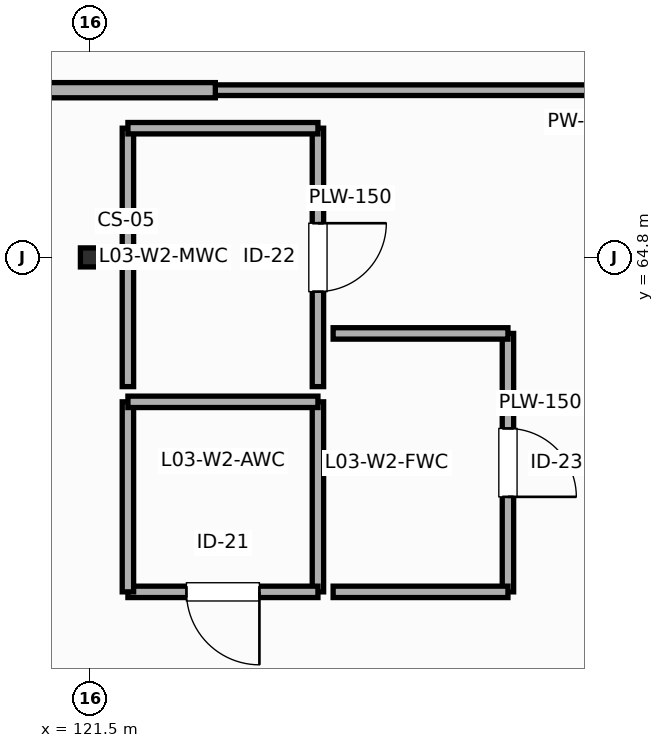
"""IFC4 building model, lengths in metres.
Left out: names, types, materials, properties, quantities, classifications, styles, units other than length and angle.
Written with IfcOpenShell. Run it as: python <this file> out.ifc"""

import sys

from ifc_helpers import new_model, si_unit, direction, frame, frame_2d, origin, origin_2d, place, context, subcontext, project, spatial, rectangle, hollow_rectangle, extrude, element, fill, save


model = new_model("IFC4")
c1 = context("Model", 3, precision=1e-05, world=origin(), true_north=direction((0.0, 1.0)))
c2 = subcontext(c1, "Body", "Model", "MODEL_VIEW")
j1 = project(units=[si_unit("LENGTHUNIT", "METRE"), si_unit("PLANEANGLEUNIT", "RADIAN")], contexts=[c1])
p1 = place(None, origin())
s1 = spatial("IfcSite", under=j1, at=p1, CompositionType="ELEMENT")
p2 = place(p1, origin())
s2 = spatial("IfcBuilding", under=s1, at=p2, CompositionType="ELEMENT")
p3 = place(p2, frame((0.0, 0.0, 15.0)))
s3 = spatial("IfcBuildingStorey", under=s2, at=p3, CompositionType="ELEMENT", Elevation=15.0)
p4 = place(p3, frame((121.5, 64.8, 0.0), z_axis=(0.0, 0.0, 1.0), x_axis=(1.0, 0.0, 0.0)))
e1 = element("IfcColumn", 1, at=p4, inside=s3, PredefinedType="COLUMN", context=c2, shape_type="SweptSolid", body=[
    extrude(hollow_rectangle(XDim=0.25, YDim=0.25, WallThickness=0.012, InnerFilletRadius=0.012, OuterFilletRadius=0.025, at=origin_2d()), origin(), (0.0, 0.0, 1.0), 4.2),
])
p5 = place(p3, frame((124.5, 62.9, 0.0), z_axis=(0.0, 0.0, 1.0), x_axis=(0.0, -1.0, 0.0)))
e2 = element("IfcWall", 2, at=p5, inside=s3, PredefinedType="PLUMBINGWALL", context=c2, shape_type="SweptSolid", body=[
    extrude(rectangle(XDim=2.5, YDim=0.15, at=frame_2d((1.25, 0.0))), origin(), (0.0, 0.0, 1.0), 3.92),
])
p6 = place(p3, frame((124.5, 60.4, 0.0), z_axis=(0.0, 0.0, 1.0), x_axis=(-1.0, 0.0, 0.0)))
e3 = element("IfcWall", 3, at=p6, inside=s3, PredefinedType="PLUMBINGWALL", context=c2, shape_type="SweptSolid", body=[
    extrude(rectangle(XDim=2.5, YDim=0.15, at=frame_2d((1.25, 0.0))), origin(), (0.0, 0.0, 1.0), 3.92),
])
p7 = place(p6, frame((0.77, 0.0, 0.0)))
e4 = element("IfcOpeningElement", 4, at=p7, cuts=e3, PredefinedType="OPENING", context=c2, shape_type="SweptSolid", body=[
    extrude(rectangle(XDim=0.96, YDim=2.16, at=frame_2d((0.48, 1.08))), frame((0.0, 0.085, 0.0), z_axis=(0.0, -1.0, 0.0), x_axis=(1.0, 0.0, 0.0)), (0.0, 0.0, 1.0), 0.17),
])
for number, where, z_axis, x_axis in (
    (5, (122.0, 60.4, 0.0), (0.0, 0.0, 1.0), (0.0, 1.0, 0.0)),
    (6, (122.0, 62.9, 0.0), (0.0, 0.0, 1.0), (1.0, 0.0, 0.0)),
):
    element("IfcWall", number, at=place(p3, frame(where, z_axis=z_axis, x_axis=x_axis)), inside=s3, PredefinedType="PLUMBINGWALL", context=c2, shape_type="SweptSolid", body=[
        extrude(rectangle(XDim=2.5, YDim=0.15, at=frame_2d((1.25, 0.0))), origin(), (0.0, 0.0, 1.0), 3.92),
    ])
p8 = place(p3, frame((127.0, 63.8, 0.0), z_axis=(0.0, 0.0, 1.0), x_axis=(0.0, -1.0, 0.0)))
e7 = element("IfcWall", 7, at=p8, inside=s3, PredefinedType="PLUMBINGWALL", context=c2, shape_type="SweptSolid", body=[
    extrude(rectangle(XDim=3.4, YDim=0.15, at=frame_2d((1.7, 0.0))), origin(), (0.0, 0.0, 1.0), 3.92),
])
p9 = place(p8, frame((1.25, 0.0, 0.0)))
e8 = element("IfcOpeningElement", 8, at=p9, cuts=e7, PredefinedType="OPENING", context=c2, shape_type="SweptSolid", body=[
    extrude(rectangle(XDim=0.9, YDim=2.2, at=frame_2d((0.45, 1.1))), frame((0.0, 0.085, 0.0), z_axis=(0.0, -1.0, 0.0), x_axis=(1.0, 0.0, 0.0)), (0.0, 0.0, 1.0), 0.17),
])
for number, where, z_axis, x_axis in (
    (9, (127.0, 60.4, 0.0), (0.0, 0.0, 1.0), (-1.0, 0.0, 0.0)),
    (10, (124.7, 63.8, 0.0), (0.0, 0.0, 1.0), (1.0, 0.0, 0.0)),
):
    element("IfcWall", number, at=place(p3, frame(where, z_axis=z_axis, x_axis=x_axis)), inside=s3, PredefinedType="PLUMBINGWALL", context=c2, shape_type="SweptSolid", body=[
        extrude(rectangle(XDim=2.3, YDim=0.15, at=frame_2d((1.15, 0.0))), origin(), (0.0, 0.0, 1.0), 3.92),
    ])
p10 = place(p3, frame((124.5, 66.5, 0.0), z_axis=(0.0, 0.0, 1.0), x_axis=(0.0, -1.0, 0.0)))
e11 = element("IfcWall", 11, at=p10, inside=s3, PredefinedType="PLUMBINGWALL", context=c2, shape_type="SweptSolid", body=[
    extrude(rectangle(XDim=3.4, YDim=0.15, at=frame_2d((1.7, 0.0))), origin(), (0.0, 0.0, 1.0), 3.92),
])
p11 = place(p10, frame((1.25, 0.0, 0.0)))
e12 = element("IfcOpeningElement", 12, at=p11, cuts=e11, PredefinedType="OPENING", context=c2, shape_type="SweptSolid", body=[
    extrude(rectangle(XDim=0.9, YDim=2.1, at=frame_2d((0.45, 1.05))), frame((0.0, 0.085, 0.0), z_axis=(0.0, -1.0, 0.0), x_axis=(1.0, 0.0, 0.0)), (0.0, 0.0, 1.0), 0.17),
])
p12 = place(p3, frame((122.0, 63.1, 0.0), z_axis=(0.0, 0.0, 1.0), x_axis=(0.0, 1.0, 0.0)))
e13 = element("IfcWall", 13, at=p12, inside=s3, PredefinedType="PLUMBINGWALL", context=c2, shape_type="SweptSolid", body=[
    extrude(rectangle(XDim=3.4, YDim=0.15, at=frame_2d((1.7, 0.0))), origin(), (0.0, 0.0, 1.0), 3.92),
])
p13 = place(p3, frame((122.0, 66.5, 0.0), z_axis=(0.0, 0.0, 1.0), x_axis=(1.0, 0.0, 0.0)))
e14 = element("IfcWall", 14, at=p13, inside=s3, PredefinedType="PLUMBINGWALL", context=c2, shape_type="SweptSolid", body=[
    extrude(rectangle(XDim=2.5, YDim=0.15, at=frame_2d((1.25, 0.0))), origin(), (0.0, 0.0, 1.0), 3.92),
])
p14 = place(p3, frame((129.8, 67.0, 0.0), z_axis=(0.0, 0.0, 1.0), x_axis=(-1.0, 0.0, 0.0)))
e15 = element("IfcWall", 15, at=p14, inside=s3, PredefinedType="PARTITIONING", context=c2, shape_type="SweptSolid", body=[
    extrude(rectangle(XDim=6.65, YDim=0.14, at=frame_2d((3.325, 0.0))), origin(), (0.0, 0.0, 1.0), 3.92),
])
p15 = place(p3, frame((123.15, 67.0, 0.0), z_axis=(0.0, 0.0, 1.0), x_axis=(-1.0, 0.0, 0.0)))
e16 = element("IfcWall", 16, at=p15, inside=s3, PredefinedType="PARTITIONING", context=c2, shape_type="SweptSolid", body=[
    extrude(rectangle(XDim=6.65, YDim=0.2, at=frame_2d((3.325, 0.0))), origin(), (0.0, 0.0, 1.0), 3.92),
])
p16 = place(p7, origin())
e17 = element("IfcDoor", 17, at=p16, inside=s3, OperationType="SINGLE_SWING_LEFT", PredefinedType="DOOR", context=c2, shape_type="SweptSolid", body=[
    extrude(rectangle(XDim=0.96, YDim=2.16, at=frame_2d((0.48, 1.08))), frame((0.0, 0.025, 0.0), z_axis=(0.0, -1.0, 0.0), x_axis=(1.0, 0.0, 0.0)), (0.0, 0.0, 1.0), 0.05),
])
fill(e4, e17)
p17 = place(p9, origin())
e18 = element("IfcDoor", 18, at=p17, inside=s3, OperationType="SINGLE_SWING_RIGHT", PredefinedType="DOOR", context=c2, shape_type="SweptSolid", body=[
    extrude(rectangle(XDim=0.9, YDim=2.2, at=frame_2d((0.45, 1.1))), frame((0.0, 0.025, 0.0), z_axis=(0.0, -1.0, 0.0), x_axis=(1.0, 0.0, 0.0)), (0.0, 0.0, 1.0), 0.05),
])
fill(e8, e18)
p18 = place(p11, origin())
e19 = element("IfcDoor", 19, at=p18, inside=s3, OperationType="SINGLE_SWING_LEFT", PredefinedType="DOOR", context=c2, shape_type="SweptSolid", body=[
    extrude(rectangle(XDim=0.9, YDim=2.1, at=frame_2d((0.45, 1.05))), frame((0.0, 0.025, 0.0), z_axis=(0.0, -1.0, 0.0), x_axis=(1.0, 0.0, 0.0)), (0.0, 0.0, 1.0), 0.05),
])
fill(e12, e19)
save(model, sys.argv[1])
